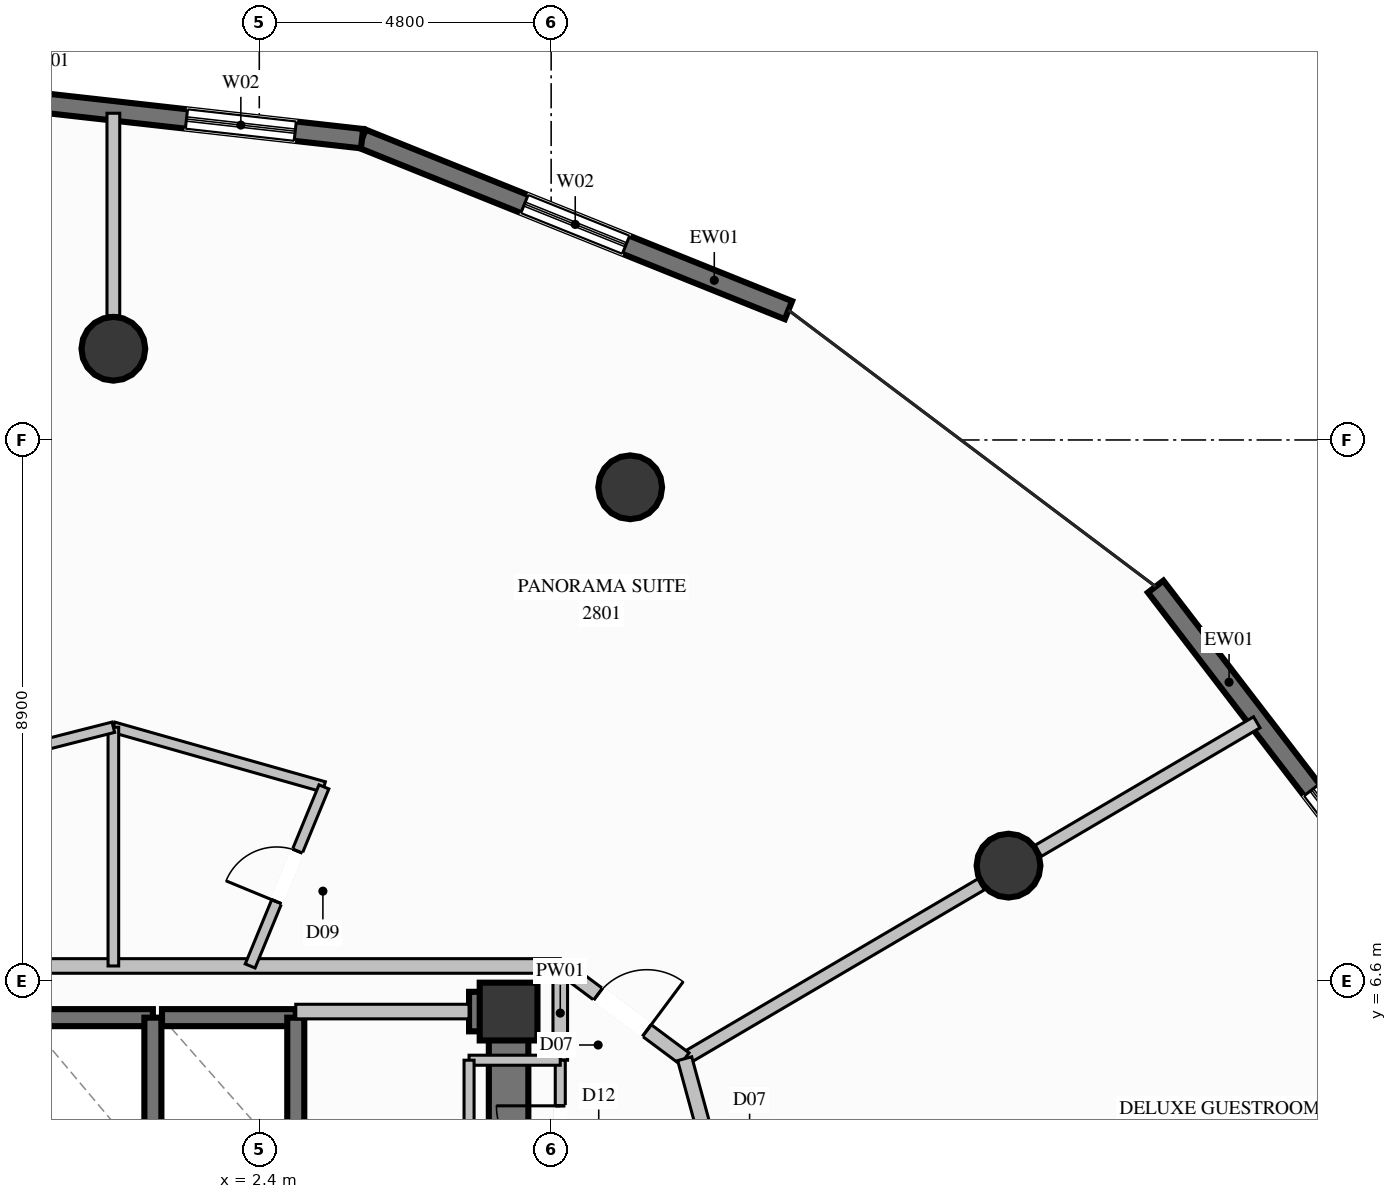
"""IFC4 building model, lengths in metres.
Left out: names, types, materials, properties, quantities, classifications, styles, units other than length and angle.
Written with IfcOpenShell. Run it as: python <this file> out.ifc"""

import sys

from ifc_helpers import new_model, si_unit, direction, frame, frame_2d, origin, origin_2d, place, context, subcontext, project, spatial, rectangle, circle, extrude, element, fill, save


model = new_model("IFC4")
c1 = context("Model", 3, precision=1e-05, world=origin(), true_north=direction((0.0, 1.0)))
c2 = subcontext(c1, "Body", "Model", "MODEL_VIEW")
j1 = project(units=[si_unit("LENGTHUNIT", "METRE"), si_unit("PLANEANGLEUNIT", "RADIAN")], contexts=[c1])
p1 = place(None, origin())
s1 = spatial("IfcSite", under=j1, at=p1, CompositionType="ELEMENT")
p2 = place(p1, origin())
s2 = spatial("IfcBuilding", under=s1, at=p2, CompositionType="ELEMENT")
p3 = place(p2, frame((0.0, 0.0, 106.2)))
s3 = spatial("IfcBuildingStorey", under=s2, at=p3, CompositionType="ELEMENT", Elevation=106.2)
p4 = place(p3, frame((6.5, 6.1, 0.0), z_axis=(0.0, 0.0, 1.0), x_axis=(1.0, 0.0, 0.0)))
e1 = element("IfcColumn", 1, at=p4, inside=s3, PredefinedType="COLUMN", context=c2, shape_type="SweptSolid", body=[
    extrude(rectangle(XDim=0.95, YDim=0.95, at=origin_2d()), origin(), (0.0, 0.0, 1.0), 3.6),
])
p5 = place(p3, frame((5.85, 6.1, 0.0), z_axis=(0.0, 0.0, 1.0), x_axis=(1.0, 0.0, 0.0)))
e2 = element("IfcWall", 2, at=p5, inside=s3, PredefinedType="SHEAR", context=c2, shape_type="SweptSolid", body=[
    extrude(rectangle(XDim=0.325, YDim=0.65, at=frame_2d((0.163, 0.0))), origin(), (0.0, 0.0, 1.0), 3.6),
])
p6 = place(p3, frame((6.5, 3.35, 0.0), z_axis=(0.0, 0.0, 1.0), x_axis=(0.0, 1.0, 0.0)))
e3 = element("IfcWall", 3, at=p6, inside=s3, PredefinedType="SHEAR", context=c2, shape_type="SweptSolid", body=[
    extrude(rectangle(XDim=3.075, YDim=0.65, at=frame_2d((1.538, 0.0))), origin(), (0.0, 0.0, 1.0), 3.6),
])
for number, where, z_axis, x_axis in (
    (4, (14.722, 8.5, 0.0), (0.0, 0.0, 1.0), (1.0, 0.0, 0.0)),
    (5, (8.5, 14.722, 0.0), (0.0, 0.0, 1.0), (1.0, 0.0, 0.0)),
    (6, (0.0, 17.0, 0.0), (0.0, 0.0, 1.0), (1.0, 0.0, 0.0)),
):
    element("IfcColumn", number, at=place(p3, frame(where, z_axis=z_axis, x_axis=x_axis)), inside=s3, PredefinedType="COLUMN", context=c2, shape_type="SweptSolid", body=[
        extrude(circle(Radius=0.525, at=origin_2d()), origin(), (0.0, 0.0, 1.0), 3.6),
    ])
p7 = place(p3, frame((17.142, 13.089, 0.0), z_axis=(0.0, 0.0, 1.0), x_axis=(0.608831916989, -0.793299247986, 0.0)))
e7 = element("IfcWall", 7, at=p7, inside=s3, PredefinedType="SOLIDWALL", context=c2, shape_type="SweptSolid", body=[
    extrude(rectangle(XDim=7.347, YDim=0.32, at=frame_2d((3.673, 0.0))), origin(), (0.0, 0.0, 1.0), 3.35),
])
p8 = place(p7, frame((4.215, 0.0, 0.35)))
e8 = element("IfcOpeningElement", 8, at=p8, cuts=e7, PredefinedType="OPENING", context=c2, shape_type="SweptSolid", body=[
    extrude(rectangle(XDim=1.8, YDim=2.6, at=frame_2d((0.9, 1.3))), frame((0.0, 0.17, 0.0), z_axis=(0.0, -1.0, 0.0), x_axis=(1.0, 0.0, 0.0)), (0.0, 0.0, 1.0), 0.34),
])
p9 = place(p3, frame((4.09, 20.455, 0.0), z_axis=(0.0, 0.0, 1.0), x_axis=(0.927795739468, -0.373088549577, 0.0)))
e9 = element("IfcWall", 9, at=p9, inside=s3, PredefinedType="SOLIDWALL", context=c2, shape_type="SweptSolid", body=[
    extrude(rectangle(XDim=7.559, YDim=0.32, at=frame_2d((3.779, 0.0))), origin(), (0.0, 0.0, 1.0), 3.35),
])
p10 = place(p9, frame((2.879, 0.0, 0.35)))
e10 = element("IfcOpeningElement", 10, at=p10, cuts=e9, PredefinedType="OPENING", context=c2, shape_type="SweptSolid", body=[
    extrude(rectangle(XDim=1.8, YDim=2.6, at=frame_2d((0.9, 1.3))), frame((0.0, 0.17, 0.0), z_axis=(0.0, -1.0, 0.0), x_axis=(1.0, 0.0, 0.0)), (0.0, 0.0, 1.0), 0.34),
])
p11 = place(p3, frame((-3.211, 21.273, 0.0), z_axis=(0.0, 0.0, 1.0), x_axis=(0.993784044115, -0.111325081016, 0.0)))
e11 = element("IfcWall", 11, at=p11, inside=s3, PredefinedType="SOLIDWALL", context=c2, shape_type="SweptSolid", body=[
    extrude(rectangle(XDim=7.347, YDim=0.32, at=frame_2d((3.673, 0.0))), origin(), (0.0, 0.0, 1.0), 3.35),
])
p12 = place(p11, frame((4.441, 0.0, 0.35)))
e12 = element("IfcOpeningElement", 12, at=p12, cuts=e11, PredefinedType="OPENING", context=c2, shape_type="SweptSolid", body=[
    extrude(rectangle(XDim=1.8, YDim=2.6, at=frame_2d((0.9, 1.3))), frame((0.0, 0.17, 0.0), z_axis=(0.0, -1.0, 0.0), x_axis=(1.0, 0.0, 0.0)), (0.0, 0.0, 1.0), 0.34),
])
p13 = place(p3, frame((0.65, 6.0, 0.0), z_axis=(0.0, 0.0, 1.0), x_axis=(-1.0, 0.0, 0.0)))
e13 = element("IfcWall", 13, at=p13, inside=s3, PredefinedType="SOLIDWALL", context=c2, shape_type="SweptSolid", body=[
    extrude(rectangle(XDim=2.1, YDim=0.28, at=frame_2d((1.05, 0.0))), origin(), (0.0, 0.0, 1.0), 3.35),
])
p14 = place(p3, frame((0.65, 3.5, 0.0), z_axis=(0.0, 0.0, 1.0), x_axis=(0.0, 1.0, 0.0)))
e14 = element("IfcWall", 14, at=p14, inside=s3, PredefinedType="SOLIDWALL", context=c2, shape_type="SweptSolid", body=[
    extrude(rectangle(XDim=2.5, YDim=0.28, at=frame_2d((1.25, 0.0))), origin(), (0.0, 0.0, 1.0), 3.35),
])
p15 = place(p3, frame((3.0, 6.0, 0.0), z_axis=(0.0, 0.0, 1.0), x_axis=(-1.0, 0.0, 0.0)))
e15 = element("IfcWall", 15, at=p15, inside=s3, PredefinedType="SOLIDWALL", context=c2, shape_type="SweptSolid", body=[
    extrude(rectangle(XDim=2.2, YDim=0.28, at=frame_2d((1.1, 0.0))), origin(), (0.0, 0.0, 1.0), 3.35),
])
p16 = place(p3, frame((3.0, 3.5, 0.0), z_axis=(0.0, 0.0, 1.0), x_axis=(0.0, 1.0, 0.0)))
e16 = element("IfcWall", 16, at=p16, inside=s3, PredefinedType="SOLIDWALL", context=c2, shape_type="SweptSolid", body=[
    extrude(rectangle(XDim=2.5, YDim=0.28, at=frame_2d((1.25, 0.0))), origin(), (0.0, 0.0, 1.0), 3.35),
])
p17 = place(p3, frame((-7.35, 6.85, 0.0), z_axis=(0.0, 0.0, 1.0), x_axis=(1.0, 0.0, 0.0)))
e17 = element("IfcWall", 17, at=p17, inside=s3, PredefinedType="PARTITIONING", context=c2, shape_type="SweptSolid", body=[
    extrude(rectangle(XDim=14.7, YDim=0.24, at=frame_2d((7.35, 0.0))), origin(), (0.0, 0.0, 1.0), 2.435),
])
p18 = place(p3, frame((7.35, 5.3, 0.0), z_axis=(0.0, 0.0, 1.0), x_axis=(0.0, 1.0, 0.0)))
e18 = element("IfcWall", 18, at=p18, inside=s3, PredefinedType="PARTITIONING", context=c2, shape_type="SweptSolid", body=[
    extrude(rectangle(XDim=1.55, YDim=0.24, at=frame_2d((0.775, 0.0))), origin(), (0.0, 0.0, 1.0), 2.435),
])
p19 = place(p3, frame((3.0, 6.1, 0.0), z_axis=(0.0, 0.0, 1.0), x_axis=(1.0, 0.0, 0.0)))
e19 = element("IfcWall", 19, at=p19, inside=s3, PredefinedType="PARTITIONING", context=c2, shape_type="SweptSolid", body=[
    extrude(rectangle(XDim=2.85, YDim=0.24, at=frame_2d((1.425, 0.0))), origin(), (0.0, 0.0, 1.0), 2.435),
])
p20 = place(p3, frame((7.35, 2.75, 0.0), z_axis=(0.0, 0.0, 1.0), x_axis=(0.0, 1.0, 0.0)))
e20 = element("IfcWall", 20, at=p20, inside=s3, PredefinedType="PARTITIONING", context=c2, shape_type="SweptSolid", body=[
    extrude(rectangle(XDim=2.55, YDim=0.165, at=frame_2d((1.275, 0.0))), origin(), (0.0, 0.0, 1.0), 3.35),
])
p21 = place(p20, frame((0.75, 0.0, 0.0)))
e21 = element("IfcOpeningElement", 21, at=p21, cuts=e20, PredefinedType="OPENING", context=c2, shape_type="SweptSolid", body=[
    extrude(rectangle(XDim=1.05, YDim=2.15, at=frame_2d((0.525, 1.075))), frame((0.0, 0.093, 0.0), z_axis=(0.0, -1.0, 0.0), x_axis=(1.0, 0.0, 0.0)), (0.0, 0.0, 1.0), 0.185),
])
p22 = place(p3, frame((7.35, 5.3, 0.0), z_axis=(0.0, 0.0, 1.0), x_axis=(-1.0, 0.0, 0.0)))
e22 = element("IfcWall", 22, at=p22, inside=s3, PredefinedType="PARTITIONING", context=c2, shape_type="SweptSolid", body=[
    extrude(rectangle(XDim=1.5, YDim=0.165, at=frame_2d((0.75, 0.0))), origin(), (0.0, 0.0, 1.0), 2.435),
])
p23 = place(p3, frame((5.85, 5.3, 0.0), z_axis=(0.0, 0.0, 1.0), x_axis=(0.0, -1.0, 0.0)))
e23 = element("IfcWall", 23, at=p23, inside=s3, PredefinedType="PARTITIONING", context=c2, shape_type="SweptSolid", body=[
    extrude(rectangle(XDim=2.55, YDim=0.165, at=frame_2d((1.275, 0.0))), origin(), (0.0, 0.0, 1.0), 2.435),
])
p24 = place(p3, frame((9.396, 5.325, 0.0), z_axis=(0.0, 0.0, 1.0), x_axis=(0.862032950085, 0.506852239778, 0.0)))
e24 = element("IfcWall", 24, at=p24, inside=s3, PredefinedType="PARTITIONING", context=c2, shape_type="SweptSolid", body=[
    extrude(rectangle(XDim=5.656, YDim=0.21, at=frame_2d((2.828, 0.0))), origin(), (0.0, 0.0, 1.0), 2.719),
])
p25 = place(p3, frame((15.21, 8.743, 0.0), z_axis=(0.0, 0.0, 1.0), x_axis=(0.862004936616, 0.506899880894, 0.0)))
e25 = element("IfcWall", 25, at=p25, inside=s3, PredefinedType="PARTITIONING", context=c2, shape_type="SweptSolid", body=[
    extrude(rectangle(XDim=4.17, YDim=0.21, at=frame_2d((2.085, 0.0))), origin(), (0.0, 0.0, 1.0), 3.35),
])
p26 = place(p3, frame((0.0, 10.776, 0.0), z_axis=(0.0, 0.0, 1.0), x_axis=(0.962140957865, -0.272552338459, 0.0)))
e26 = element("IfcWall", 26, at=p26, inside=s3, PredefinedType="PLUMBINGWALL", context=c2, shape_type="SweptSolid", body=[
    extrude(rectangle(XDim=3.599, YDim=0.175, at=frame_2d((1.8, 0.0))), origin(), (0.0, 0.0, 1.0), 2.985),
])
p27 = place(p3, frame((0.0, 10.776, 0.0), z_axis=(0.0, 0.0, 1.0), x_axis=(0.0, -1.0, 0.0)))
e27 = element("IfcWall", 27, at=p27, inside=s3, PredefinedType="PLUMBINGWALL", context=c2, shape_type="SweptSolid", body=[
    extrude(rectangle(XDim=3.926, YDim=0.175, at=frame_2d((1.963, 0.0))), origin(), (0.0, 0.0, 1.0), 3.35),
])
p28 = place(p3, frame((2.25, 6.85, 0.0), z_axis=(0.0, 0.0, 1.0), x_axis=(0.380834625893, 0.924643167779, 0.0)))
e28 = element("IfcWall", 28, at=p28, inside=s3, PredefinedType="PLUMBINGWALL", context=c2, shape_type="SweptSolid", body=[
    extrude(rectangle(XDim=3.185, YDim=0.175, at=frame_2d((1.592, 0.0))), origin(), (0.0, 0.0, 1.0), 3.35),
])
p29 = place(p28, frame((1.143, 0.0, 0.0)))
e29 = element("IfcOpeningElement", 29, at=p29, cuts=e28, PredefinedType="OPENING", context=c2, shape_type="SweptSolid", body=[
    extrude(rectangle(XDim=0.9, YDim=2.1, at=frame_2d((0.45, 1.05))), frame((0.0, 0.098, 0.0), z_axis=(0.0, -1.0, 0.0), x_axis=(1.0, 0.0, 0.0)), (0.0, 0.0, 1.0), 0.195),
])
p30 = place(p3, frame((0.0, 17.545, 0.0), z_axis=(0.0, 0.0, 1.0), x_axis=(0.0, 1.0, 0.0)))
e30 = element("IfcWall", 30, at=p30, inside=s3, PredefinedType="PARTITIONING", context=c2, shape_type="SweptSolid", body=[
    extrude(rectangle(XDim=3.328, YDim=0.21, at=frame_2d((1.664, 0.0))), origin(), (0.0, 0.0, 1.0), 3.35),
])
p31 = place(p3, frame((7.35, 6.85, 0.0), z_axis=(0.0, 0.0, 1.0), x_axis=(0.8017416961, -0.597670689205, 0.0)))
e31 = element("IfcWall", 31, at=p31, inside=s3, PredefinedType="PARTITIONING", context=c2, shape_type="SweptSolid", body=[
    extrude(rectangle(XDim=2.552, YDim=0.24, at=frame_2d((1.276, 0.0))), origin(), (0.0, 0.0, 1.0), 3.35),
])
p32 = place(p31, frame((0.776, 0.0, 0.0)))
e32 = element("IfcOpeningElement", 32, at=p32, cuts=e31, PredefinedType="OPENING", context=c2, shape_type="SweptSolid", body=[
    extrude(rectangle(XDim=1.0, YDim=2.2, at=frame_2d((0.5, 1.1))), frame((0.0, 0.13, 0.0), z_axis=(0.0, -1.0, 0.0), x_axis=(1.0, 0.0, 0.0)), (0.0, 0.0, 1.0), 0.26),
])
p33 = place(p3, frame((-3.584, 9.865, 0.0), z_axis=(0.0, 0.0, 1.0), x_axis=(0.969187500781, 0.246324152957, 0.0)))
e33 = element("IfcWall", 33, at=p33, inside=s3, PredefinedType="PLUMBINGWALL", context=c2, shape_type="SweptSolid", body=[
    extrude(rectangle(XDim=3.698, YDim=0.175, at=frame_2d((1.849, 0.0))), origin(), (0.0, 0.0, 1.0), 2.985),
])
p34 = place(p3, frame((10.239, 2.236, 0.0), z_axis=(0.0, 0.0, 1.0), x_axis=(-0.26329160366, 0.964716295831, 0.0)))
e34 = element("IfcWall", 34, at=p34, inside=s3, PredefinedType="PARTITIONING", context=c2, shape_type="SweptSolid", body=[
    extrude(rectangle(XDim=3.202, YDim=0.24, at=frame_2d((1.601, 0.0))), origin(), (0.0, 0.0, 1.0), 3.35),
])
p35 = place(p34, frame((1.101, 0.0, 0.0)))
e35 = element("IfcOpeningElement", 35, at=p35, cuts=e34, PredefinedType="OPENING", context=c2, shape_type="SweptSolid", body=[
    extrude(rectangle(XDim=1.0, YDim=2.2, at=frame_2d((0.5, 1.1))), frame((0.0, 0.13, 0.0), z_axis=(0.0, -1.0, 0.0), x_axis=(1.0, 0.0, 0.0)), (0.0, 0.0, 1.0), 0.26),
])
p36 = place(p8, origin())
e36 = element("IfcWindow", 36, at=p36, inside=s3, PartitioningType="SINGLE_PANEL", PredefinedType="WINDOW", context=c2, shape_type="SweptSolid", body=[
    extrude(rectangle(XDim=1.8, YDim=2.6, at=frame_2d((0.9, 1.3))), frame((0.0, 0.03, 0.0), z_axis=(0.0, -1.0, 0.0), x_axis=(1.0, 0.0, 0.0)), (0.0, 0.0, 1.0), 0.06),
])
fill(e8, e36)
p37 = place(p10, origin())
e37 = element("IfcWindow", 37, at=p37, inside=s3, PartitioningType="SINGLE_PANEL", PredefinedType="WINDOW", context=c2, shape_type="SweptSolid", body=[
    extrude(rectangle(XDim=1.8, YDim=2.6, at=frame_2d((0.9, 1.3))), frame((0.0, 0.03, 0.0), z_axis=(0.0, -1.0, 0.0), x_axis=(1.0, 0.0, 0.0)), (0.0, 0.0, 1.0), 0.06),
])
fill(e10, e37)
p38 = place(p12, origin())
e38 = element("IfcWindow", 38, at=p38, inside=s3, PartitioningType="SINGLE_PANEL", PredefinedType="WINDOW", context=c2, shape_type="SweptSolid", body=[
    extrude(rectangle(XDim=1.8, YDim=2.6, at=frame_2d((0.9, 1.3))), frame((0.0, 0.03, 0.0), z_axis=(0.0, -1.0, 0.0), x_axis=(1.0, 0.0, 0.0)), (0.0, 0.0, 1.0), 0.06),
])
fill(e12, e38)
p39 = place(p21, origin())
e39 = element("IfcDoor", 39, at=p39, inside=s3, OperationType="SINGLE_SWING_RIGHT", PredefinedType="DOOR", context=c2, shape_type="SweptSolid", body=[
    extrude(rectangle(XDim=1.05, YDim=2.15, at=frame_2d((0.525, 1.075))), frame((0.0, 0.025, 0.0), z_axis=(0.0, -1.0, 0.0), x_axis=(1.0, 0.0, 0.0)), (0.0, 0.0, 1.0), 0.05),
])
fill(e21, e39)
p40 = place(p29, origin())
e40 = element("IfcDoor", 40, at=p40, inside=s3, OperationType="SINGLE_SWING_LEFT", PredefinedType="DOOR", context=c2, shape_type="SweptSolid", body=[
    extrude(rectangle(XDim=0.9, YDim=2.1, at=frame_2d((0.45, 1.05))), frame((0.0, 0.025, 0.0), z_axis=(0.0, -1.0, 0.0), x_axis=(1.0, 0.0, 0.0)), (0.0, 0.0, 1.0), 0.05),
])
fill(e29, e40)
p41 = place(p32, origin())
e41 = element("IfcDoor", 41, at=p41, inside=s3, OperationType="SINGLE_SWING_RIGHT", PredefinedType="DOOR", context=c2, shape_type="SweptSolid", body=[
    extrude(rectangle(XDim=1.0, YDim=2.2, at=frame_2d((0.5, 1.1))), frame((0.0, 0.025, 0.0), z_axis=(0.0, -1.0, 0.0), x_axis=(1.0, 0.0, 0.0)), (0.0, 0.0, 1.0), 0.05),
])
fill(e32, e41)
save(model, sys.argv[1])
